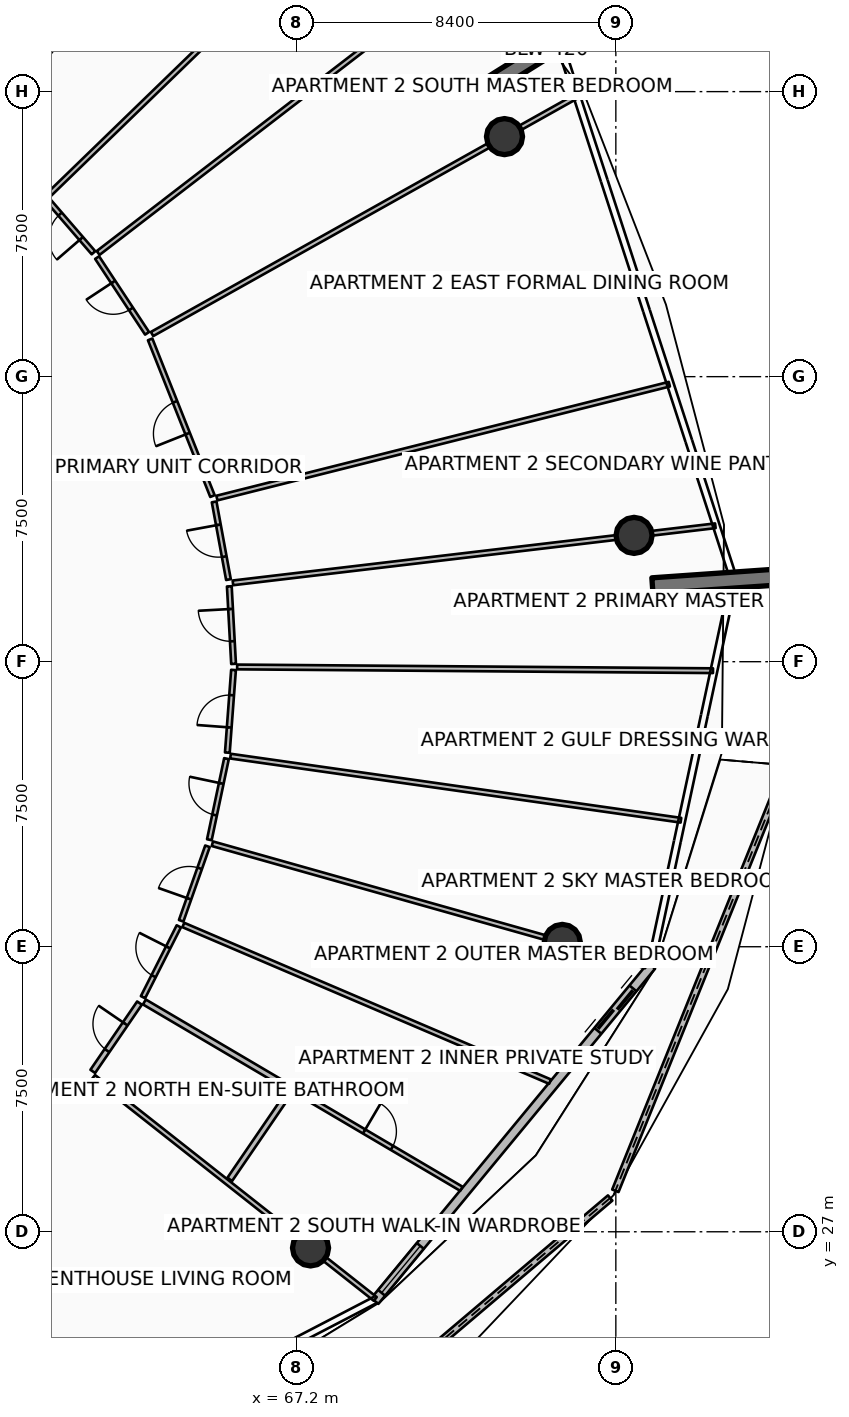
"""IFC4 building model, lengths in metres.
Left out: names, types, materials, properties, quantities, classifications, styles, units other than length and angle.
Written with IfcOpenShell. Run it as: python <this file> out.ifc"""

import sys

from ifc_helpers import new_model, si_unit, direction, frame, frame_2d, origin, origin_2d, place, context, subcontext, project, spatial, polyline, rectangle, circle, outline, extrude, element, fill, save


model = new_model("IFC4")
c1 = context("Model", 3, precision=1e-05, world=origin(), true_north=direction((0.0, 1.0)))
c2 = subcontext(c1, "Body", "Model", "MODEL_VIEW")
j1 = project(units=[si_unit("LENGTHUNIT", "METRE"), si_unit("PLANEANGLEUNIT", "RADIAN")], contexts=[c1])
p1 = place(None, origin())
s1 = spatial("IfcSite", under=j1, at=p1, CompositionType="ELEMENT")
p2 = place(p1, origin())
s2 = spatial("IfcBuilding", under=s1, at=p2, CompositionType="ELEMENT")
p3 = place(p2, frame((0.0, 0.0, 286.75)))
s3 = spatial("IfcBuildingStorey", under=s2, at=p3, CompositionType="ELEMENT", Elevation=286.75)
p4 = place(p3, frame((72.281, 57.173, 0.0), z_axis=(0.0, 0.0, 1.0), x_axis=(0.848033572426, 0.529942506352, 0.0)))
e1 = element("IfcWall", 1, at=p4, inside=s3, PredefinedType="SOLIDWALL", context=c2, shape_type="SweptSolid", body=[
    extrude(rectangle(XDim=3.5, YDim=0.42, at=frame_2d((1.75, 0.0))), origin(), (0.0, 0.0, 1.0), 3.85),
])
p5 = place(p3, frame((76.562, 43.997, 0.0), z_axis=(0.0, 0.0, 1.0), x_axis=(0.997563824095, 0.069759707979, 0.0)))
e2 = element("IfcWall", 2, at=p5, inside=s3, PredefinedType="SOLIDWALL", context=c2, shape_type="SweptSolid", body=[
    extrude(rectangle(XDim=3.5, YDim=0.42, at=frame_2d((1.75, 0.0))), origin(), (0.0, 0.0, 1.0), 3.85),
])
for number, where, z_axis, x_axis in (
    (3, (72.67, 55.816, 0.0), (0.0, 0.0, 1.0), (1.0, 0.0, 0.0)),
    (4, (67.566, 26.575, 0.0), (0.0, 0.0, 1.0), (1.0, 0.0, 0.0)),
    (5, (74.191, 34.613, 0.0), (0.0, 0.0, 1.0), (1.0, 0.0, 0.0)),
    (6, (76.08, 45.323, 0.0), (0.0, 0.0, 1.0), (1.0, 0.0, 0.0)),
):
    element("IfcColumn", number, at=place(p3, frame(where, z_axis=z_axis, x_axis=x_axis)), inside=s3, PredefinedType="COLUMN", context=c2, shape_type="SweptSolid", body=[
        extrude(circle(Radius=0.475, at=origin_2d()), origin(), (0.0, 0.0, 1.0), 3.59),
    ])
p6 = place(p3, frame((66.652, 20.429, 0.0), z_axis=(0.0, 0.0, 1.0), x_axis=(0.762735629532, 0.646710413896, 0.0)))
e7 = element("IfcWall", 7, at=p6, inside=s3, PredefinedType="PARAPET", context=c2, shape_type="SweptSolid", body=[
    extrude(outline(polyline([(0.0, 0.0), (11.535, 0.0), (11.535, 1.632), (5.768, 1.798), (0.0, 1.86), (0.0, 0.0)])), frame((0.0, 0.09, 0.0), z_axis=(0.0, -1.0, 0.0), x_axis=(1.0, 0.0, 0.0)), (0.0, 0.0, 1.0), 0.18),
])
p7 = place(p3, frame((75.587, 28.078, 0.0), z_axis=(0.0, 0.0, 1.0), x_axis=(0.374094279698, 0.927390678138, 0.0)))
e8 = element("IfcWall", 8, at=p7, inside=s3, PredefinedType="PARAPET", context=c2, shape_type="SweptSolid", body=[
    extrude(outline(polyline([(0.0, 0.0), (12.075, 0.0), (12.075, 1.233), (6.037, 1.418), (0.0, 1.632), (0.0, 0.0)])), frame((0.0, 0.09, 0.0), z_axis=(0.0, -1.0, 0.0), x_axis=(1.0, 0.0, 0.0)), (0.0, 0.0, 1.0), 0.18),
])
p8 = place(p3, frame((69.258, 25.178, 0.0), z_axis=(0.0, 0.0, 1.0), x_axis=(0.636680093065, 0.771128043255, 0.0)))
e9 = element("IfcWall", 9, at=p8, inside=s3, PredefinedType="SOLIDWALL", context=c2, shape_type="SweptSolid", body=[
    extrude(rectangle(XDim=11.438, YDim=0.24, at=frame_2d((5.719, 0.0))), origin(), (0.0, 0.0, 1.0), 2.54),
])
p9 = place(p8, frame((9.218, 0.0, 0.0)))
e10 = element("IfcOpeningElement", 10, at=p9, cuts=e9, PredefinedType="OPENING", context=c2, shape_type="SweptSolid", body=[
    extrude(rectangle(XDim=1.45, YDim=2.15, at=frame_2d((0.725, 1.075))), frame((0.0, 0.13, 0.0), z_axis=(0.0, -1.0, 0.0), x_axis=(1.0, 0.0, 0.0)), (0.0, 0.0, 1.0), 0.26),
])
p10 = place(p8, frame((0.28, 0.0, 0.65)))
e11 = element("IfcOpeningElement", 11, at=p10, cuts=e9, PredefinedType="OPENING", context=c2, shape_type="SweptSolid", body=[
    extrude(rectangle(XDim=1.6, YDim=1.5, at=frame_2d((0.8, 0.75))), frame((0.0, 0.13, 0.0), z_axis=(0.0, -1.0, 0.0), x_axis=(1.0, 0.0, 0.0)), (0.0, 0.0, 1.0), 0.26),
])
p11 = place(p3, frame((56.188, 52.386, 0.0), z_axis=(0.0, 0.0, 1.0), x_axis=(0.619097230176, 0.785314344443, 0.0)))
e12 = element("IfcWall", 12, at=p11, inside=s3, PredefinedType="PARTITIONING", context=c2, shape_type="SweptSolid", body=[
    extrude(rectangle(XDim=16.37, YDim=0.18, at=frame_2d((8.185, 0.0))), origin(), (0.0, 0.0, 1.0), 2.957),
])
p12 = place(p3, frame((61.858, 31.075, 0.0), z_axis=(0.0, 0.0, 1.0), x_axis=(0.785325513659, -0.619083061952, 0.0)))
e13 = element("IfcWall", 13, at=p12, inside=s3, PredefinedType="PARTITIONING", context=c2, shape_type="SweptSolid", body=[
    extrude(rectangle(XDim=9.438, YDim=0.125, at=frame_2d((4.719, 0.0))), origin(), (0.0, 0.0, 1.0), 2.957),
])
p13 = place(p3, frame((61.836, 31.22, 0.0), z_axis=(0.0, 0.0, 1.0), x_axis=(0.564720073442, 0.825282520505, 0.0)))
e14 = element("IfcWall", 14, at=p13, inside=s3, PredefinedType="PARTITIONING", context=c2, shape_type="SweptSolid", body=[
    extrude(rectangle(XDim=2.178, YDim=0.15, at=frame_2d((1.089, 0.0))), origin(), (0.0, 0.0, 1.0), 2.957),
])
p14 = place(p13, frame((0.664, 0.0, 0.0)))
e15 = element("IfcOpeningElement", 15, at=p14, cuts=e14, PredefinedType="OPENING", context=c2, shape_type="SweptSolid", body=[
    extrude(rectangle(XDim=0.85, YDim=2.06, at=frame_2d((0.425, 1.03))), frame((0.0, 0.085, 0.0), z_axis=(0.0, -1.0, 0.0), x_axis=(1.0, 0.0, 0.0)), (0.0, 0.0, 1.0), 0.17),
])
p15 = place(p3, frame((65.44, 28.378, 0.0), z_axis=(0.0, 0.0, 1.0), x_axis=(0.564687043446, 0.82530512113, 0.0)))
e16 = element("IfcWall", 16, at=p15, inside=s3, PredefinedType="PARTITIONING", context=c2, shape_type="SweptSolid", body=[
    extrude(rectangle(XDim=2.798, YDim=0.15, at=frame_2d((1.399, 0.0))), origin(), (0.0, 0.0, 1.0), 2.957),
])
p16 = place(p3, frame((63.194, 33.046, 0.0), z_axis=(0.0, 0.0, 1.0), x_axis=(0.8615329034, -0.507701739566, 0.0)))
e17 = element("IfcWall", 17, at=p16, inside=s3, PredefinedType="PARTITIONING", context=c2, shape_type="SweptSolid", body=[
    extrude(rectangle(XDim=4.46, YDim=0.15, at=frame_2d((2.23, 0.0))), origin(), (0.0, 0.0, 1.0), 3.03),
])
p17 = place(p3, frame((67.149, 30.716, 0.0), z_axis=(0.0, 0.0, 1.0), x_axis=(0.861535840118, -0.507696756136, 0.0)))
e18 = element("IfcWall", 18, at=p17, inside=s3, PredefinedType="PARTITIONING", context=c2, shape_type="SweptSolid", body=[
    extrude(rectangle(XDim=5.092, YDim=0.125, at=frame_2d((2.546, 0.0))), origin(), (0.0, 0.0, 1.0), 3.03),
])
p18 = place(p17, frame((2.121, 0.0, 0.0)))
e19 = element("IfcOpeningElement", 19, at=p18, cuts=e18, PredefinedType="OPENING", context=c2, shape_type="SweptSolid", body=[
    extrude(rectangle(XDim=0.85, YDim=2.06, at=frame_2d((0.425, 1.03))), frame((0.0, 0.073, 0.0), z_axis=(0.0, -1.0, 0.0), x_axis=(1.0, 0.0, 0.0)), (0.0, 0.0, 1.0), 0.145),
])
p19 = place(p3, frame((64.219, 35.072, 0.0), z_axis=(0.0, 0.0, 1.0), x_axis=(0.91961011962, -0.392832315235, 0.0)))
e20 = element("IfcWall", 20, at=p19, inside=s3, PredefinedType="PARTITIONING", context=c2, shape_type="SweptSolid", body=[
    extrude(rectangle(XDim=10.493, YDim=0.125, at=frame_2d((5.247, 0.0))), origin(), (0.0, 0.0, 1.0), 3.03),
])
p20 = place(p3, frame((63.157, 33.172, 0.0), z_axis=(0.0, 0.0, 1.0), x_axis=(0.451230403471, 0.892407487073, 0.0)))
e21 = element("IfcWall", 21, at=p20, inside=s3, PredefinedType="PARTITIONING", context=c2, shape_type="SweptSolid", body=[
    extrude(rectangle(XDim=2.088, YDim=0.125, at=frame_2d((1.044, 0.0))), origin(), (0.0, 0.0, 1.0), 3.03),
])
p21 = place(p20, frame((0.619, 0.0, 0.0)))
e22 = element("IfcOpeningElement", 22, at=p21, cuts=e21, PredefinedType="OPENING", context=c2, shape_type="SweptSolid", body=[
    extrude(rectangle(XDim=0.85, YDim=2.06, at=frame_2d((0.425, 1.03))), frame((0.0, 0.073, 0.0), z_axis=(0.0, -1.0, 0.0), x_axis=(1.0, 0.0, 0.0)), (0.0, 0.0, 1.0), 0.145),
])
p22 = place(p3, frame((64.162, 35.183, 0.0), z_axis=(0.0, 0.0, 1.0), x_axis=(0.332881557629, 0.942968646664, 0.0)))
e23 = element("IfcWall", 23, at=p22, inside=s3, PredefinedType="PARTITIONING", context=c2, shape_type="SweptSolid", body=[
    extrude(rectangle(XDim=2.079, YDim=0.125, at=frame_2d((1.039, 0.0))), origin(), (0.0, 0.0, 1.0), 2.957),
])
p23 = place(p22, frame((0.614, 0.0, 0.0)))
e24 = element("IfcOpeningElement", 24, at=p23, cuts=e23, PredefinedType="OPENING", context=c2, shape_type="SweptSolid", body=[
    extrude(rectangle(XDim=0.85, YDim=2.06, at=frame_2d((0.425, 1.03))), frame((0.0, 0.073, 0.0), z_axis=(0.0, -1.0, 0.0), x_axis=(1.0, 0.0, 0.0)), (0.0, 0.0, 1.0), 0.145),
])
p24 = place(p3, frame((64.983, 37.21, 0.0), z_axis=(0.0, 0.0, 1.0), x_axis=(0.962453678557, -0.271445973691, 0.0)))
e25 = element("IfcWall", 25, at=p24, inside=s3, PredefinedType="PARTITIONING", context=c2, shape_type="SweptSolid", body=[
    extrude(rectangle(XDim=11.85, YDim=0.125, at=frame_2d((5.925, 0.0))), origin(), (0.0, 0.0, 1.0), 2.957),
])
p25 = place(p3, frame((65.46, 39.515, 0.0), z_axis=(0.0, 0.0, 1.0), x_axis=(0.990024400928, -0.140896009764, 0.0)))
e26 = element("IfcWall", 26, at=p25, inside=s3, PredefinedType="PARTITIONING", context=c2, shape_type="SweptSolid", body=[
    extrude(rectangle(XDim=11.972, YDim=0.125, at=frame_2d((5.986, 0.0))), origin(), (0.0, 0.0, 1.0), 3.03),
])
p26 = place(p3, frame((65.635, 41.862, 0.0), z_axis=(0.0, 0.0, 1.0), x_axis=(0.999969129377, -0.007857499155, 0.0)))
e27 = element("IfcWall", 27, at=p26, inside=s3, PredefinedType="PARTITIONING", context=c2, shape_type="SweptSolid", body=[
    extrude(rectangle(XDim=12.522, YDim=0.125, at=frame_2d((6.261, 0.0))), origin(), (0.0, 0.0, 1.0), 3.03),
])
p27 = place(p3, frame((64.904, 37.316, 0.0), z_axis=(0.0, 0.0, 1.0), x_axis=(0.206653610436, 0.978414168588, 0.0)))
e28 = element("IfcWall", 28, at=p27, inside=s3, PredefinedType="PARTITIONING", context=c2, shape_type="SweptSolid", body=[
    extrude(rectangle(XDim=2.181, YDim=0.125, at=frame_2d((1.09, 0.0))), origin(), (0.0, 0.0, 1.0), 2.957),
])
p28 = place(p27, frame((0.665, 0.0, 0.0)))
e29 = element("IfcOpeningElement", 29, at=p28, cuts=e28, PredefinedType="OPENING", context=c2, shape_type="SweptSolid", body=[
    extrude(rectangle(XDim=0.85, YDim=2.06, at=frame_2d((0.425, 1.03))), frame((0.0, 0.073, 0.0), z_axis=(0.0, -1.0, 0.0), x_axis=(1.0, 0.0, 0.0)), (0.0, 0.0, 1.0), 0.145),
])
p29 = place(p3, frame((65.377, 39.607, 0.0), z_axis=(0.0, 0.0, 1.0), x_axis=(0.074547851994, 0.997217437555, 0.0)))
e30 = element("IfcWall", 30, at=p29, inside=s3, PredefinedType="PARTITIONING", context=c2, shape_type="SweptSolid", body=[
    extrude(rectangle(XDim=2.181, YDim=0.125, at=frame_2d((1.091, 0.0))), origin(), (0.0, 0.0, 1.0), 3.03),
])
p30 = place(p29, frame((0.666, 0.0, 0.0)))
e31 = element("IfcOpeningElement", 31, at=p30, cuts=e30, PredefinedType="OPENING", context=c2, shape_type="SweptSolid", body=[
    extrude(rectangle(XDim=0.85, YDim=2.06, at=frame_2d((0.425, 1.03))), frame((0.0, 0.073, 0.0), z_axis=(0.0, -1.0, 0.0), x_axis=(1.0, 0.0, 0.0)), (0.0, 0.0, 1.0), 0.145),
])
p31 = place(p3, frame((65.541, 41.942, 0.0), z_axis=(0.0, 0.0, 1.0), x_axis=(-0.054960479128, 0.998488530597, 0.0)))
e32 = element("IfcWall", 32, at=p31, inside=s3, PredefinedType="PARTITIONING", context=c2, shape_type="SweptSolid", body=[
    extrude(rectangle(XDim=2.043, YDim=0.125, at=frame_2d((1.022, 0.0))), origin(), (0.0, 0.0, 1.0), 2.957),
])
p32 = place(p31, frame((0.597, 0.0, 0.0)))
e33 = element("IfcOpeningElement", 33, at=p32, cuts=e32, PredefinedType="OPENING", context=c2, shape_type="SweptSolid", body=[
    extrude(rectangle(XDim=0.85, YDim=2.06, at=frame_2d((0.425, 1.03))), frame((0.0, 0.073, 0.0), z_axis=(0.0, -1.0, 0.0), x_axis=(1.0, 0.0, 0.0)), (0.0, 0.0, 1.0), 0.145),
])
p33 = place(p3, frame((65.524, 44.074, 0.0), z_axis=(0.0, 0.0, 1.0), x_axis=(0.993069543008, 0.117528221075, 0.0)))
e34 = element("IfcWall", 34, at=p33, inside=s3, PredefinedType="PARTITIONING", context=c2, shape_type="SweptSolid", body=[
    extrude(rectangle(XDim=12.784, YDim=0.125, at=frame_2d((6.392, 0.0))), origin(), (0.0, 0.0, 1.0), 2.957),
])
p34 = place(p3, frame((65.102, 46.305, 0.0), z_axis=(0.0, 0.0, 1.0), x_axis=(0.969744651586, 0.244121508108, 0.0)))
e35 = element("IfcWall", 35, at=p34, inside=s3, PredefinedType="PARTITIONING", context=c2, shape_type="SweptSolid", body=[
    extrude(rectangle(XDim=12.277, YDim=0.125, at=frame_2d((6.138, 0.0))), origin(), (0.0, 0.0, 1.0), 3.03),
])
p35 = place(p3, frame((65.406, 44.161, 0.0), z_axis=(0.0, 0.0, 1.0), x_axis=(-0.181252122481, 0.983436661965, 0.0)))
e36 = element("IfcWall", 36, at=p35, inside=s3, PredefinedType="PARTITIONING", context=c2, shape_type="SweptSolid", body=[
    extrude(rectangle(XDim=2.078, YDim=0.125, at=frame_2d((1.039, 0.0))), origin(), (0.0, 0.0, 1.0), 2.957),
])
p36 = place(p35, frame((0.614, 0.0, 0.0)))
e37 = element("IfcOpeningElement", 37, at=p36, cuts=e36, PredefinedType="OPENING", context=c2, shape_type="SweptSolid", body=[
    extrude(rectangle(XDim=0.85, YDim=2.06, at=frame_2d((0.425, 1.03))), frame((0.0, 0.073, 0.0), z_axis=(0.0, -1.0, 0.0), x_axis=(1.0, 0.0, 0.0)), (0.0, 0.0, 1.0), 0.145),
])
p37 = place(p3, frame((64.986, 46.358, 0.0), z_axis=(0.0, 0.0, 1.0), x_axis=(-0.369596956752, 0.929192170414, 0.0)))
e38 = element("IfcWall", 38, at=p37, inside=s3, PredefinedType="PARTITIONING", context=c2, shape_type="SweptSolid", body=[
    extrude(rectangle(XDim=4.437, YDim=0.125, at=frame_2d((2.219, 0.0))), origin(), (0.0, 0.0, 1.0), 2.957),
])
p38 = place(p37, frame((1.768, 0.0, 0.0)))
e39 = element("IfcOpeningElement", 39, at=p38, cuts=e38, PredefinedType="OPENING", context=c2, shape_type="SweptSolid", body=[
    extrude(rectangle(XDim=0.9, YDim=2.08, at=frame_2d((0.45, 1.04))), frame((0.0, 0.073, 0.0), z_axis=(0.0, -1.0, 0.0), x_axis=(1.0, 0.0, 0.0)), (0.0, 0.0, 1.0), 0.145),
])
p39 = place(p3, frame((63.396, 50.622, 0.0), z_axis=(0.0, 0.0, 1.0), x_axis=(0.872499176967, 0.4886155812, 0.0)))
e40 = element("IfcWall", 40, at=p39, inside=s3, PredefinedType="PARTITIONING", context=c2, shape_type="SweptSolid", body=[
    extrude(rectangle(XDim=12.784, YDim=0.125, at=frame_2d((6.392, 0.0))), origin(), (0.0, 0.0, 1.0), 2.957),
])
p40 = place(p3, frame((61.978, 52.754, 0.0), z_axis=(0.0, 0.0, 1.0), x_axis=(0.792559605076, 0.609794450944, 0.0)))
e41 = element("IfcWall", 41, at=p40, inside=s3, PredefinedType="PARTITIONING", context=c2, shape_type="SweptSolid", body=[
    extrude(rectangle(XDim=12.406, YDim=0.125, at=frame_2d((6.203, 0.0))), origin(), (0.0, 0.0, 1.0), 3.03),
])
p41 = place(p3, frame((60.665, 54.273, 0.0), z_axis=(0.0, 0.0, 1.0), x_axis=(0.718133524399, 0.695905339205, 0.0)))
e42 = element("IfcWall", 42, at=p41, inside=s3, PredefinedType="PARTITIONING", context=c2, shape_type="SweptSolid", body=[
    extrude(rectangle(XDim=11.972, YDim=0.125, at=frame_2d((5.986, 0.0))), origin(), (0.0, 0.0, 1.0), 3.03),
])
p42 = place(p3, frame((63.265, 50.64, 0.0), z_axis=(0.0, 0.0, 1.0), x_axis=(-0.550634170063, 0.834746674602, 0.0)))
e43 = element("IfcWall", 43, at=p42, inside=s3, PredefinedType="PARTITIONING", context=c2, shape_type="SweptSolid", body=[
    extrude(rectangle(XDim=2.387, YDim=0.125, at=frame_2d((1.194, 0.0))), origin(), (0.0, 0.0, 1.0), 2.957),
])
p43 = place(p42, frame((0.769, 0.0, 0.0)))
e44 = element("IfcOpeningElement", 44, at=p43, cuts=e43, PredefinedType="OPENING", context=c2, shape_type="SweptSolid", body=[
    extrude(rectangle(XDim=0.85, YDim=2.06, at=frame_2d((0.425, 1.03))), frame((0.0, 0.073, 0.0), z_axis=(0.0, -1.0, 0.0), x_axis=(1.0, 0.0, 0.0)), (0.0, 0.0, 1.0), 0.145),
])
p44 = place(p3, frame((61.854, 52.76, 0.0), z_axis=(0.0, 0.0, 1.0), x_axis=(-0.653948493608, 0.756539072162, 0.0)))
e45 = element("IfcWall", 45, at=p44, inside=s3, PredefinedType="PARTITIONING", context=c2, shape_type="SweptSolid", body=[
    extrude(rectangle(XDim=1.837, YDim=0.125, at=frame_2d((0.918, 0.0))), origin(), (0.0, 0.0, 1.0), 3.03),
])
p45 = place(p44, frame((0.494, 0.0, 0.0)))
e46 = element("IfcOpeningElement", 46, at=p45, cuts=e45, PredefinedType="OPENING", context=c2, shape_type="SweptSolid", body=[
    extrude(rectangle(XDim=0.85, YDim=2.06, at=frame_2d((0.425, 1.03))), frame((0.0, 0.073, 0.0), z_axis=(0.0, -1.0, 0.0), x_axis=(1.0, 0.0, 0.0)), (0.0, 0.0, 1.0), 0.145),
])
p46 = place(p9, origin())
e47 = element("IfcDoor", 47, at=p46, inside=s3, OperationType="DOUBLE_DOOR_SLIDING", PredefinedType="DOOR", context=c2, shape_type="SweptSolid", body=[
    extrude(rectangle(XDim=1.45, YDim=2.15, at=frame_2d((0.725, 1.075))), frame((0.0, 0.025, 0.0), z_axis=(0.0, -1.0, 0.0), x_axis=(1.0, 0.0, 0.0)), (0.0, 0.0, 1.0), 0.05),
])
fill(e10, e47)
p47 = place(p10, origin())
e48 = element("IfcWindow", 48, at=p47, inside=s3, PartitioningType="SINGLE_PANEL", PredefinedType="WINDOW", context=c2, shape_type="SweptSolid", body=[
    extrude(rectangle(XDim=1.6, YDim=1.5, at=frame_2d((0.8, 0.75))), frame((0.0, 0.03, 0.0), z_axis=(0.0, -1.0, 0.0), x_axis=(1.0, 0.0, 0.0)), (0.0, 0.0, 1.0), 0.06),
])
fill(e11, e48)
p48 = place(p14, origin())
e49 = element("IfcDoor", 49, at=p48, inside=s3, OperationType="SINGLE_SWING_RIGHT", PredefinedType="DOOR", context=c2, shape_type="SweptSolid", body=[
    extrude(rectangle(XDim=0.85, YDim=2.06, at=frame_2d((0.425, 1.03))), frame((0.0, 0.025, 0.0), z_axis=(0.0, -1.0, 0.0), x_axis=(1.0, 0.0, 0.0)), (0.0, 0.0, 1.0), 0.05),
])
fill(e15, e49)
p49 = place(p18, origin())
e50 = element("IfcDoor", 50, at=p49, inside=s3, OperationType="SINGLE_SWING_LEFT", PredefinedType="DOOR", context=c2, shape_type="SweptSolid", body=[
    extrude(rectangle(XDim=0.85, YDim=2.06, at=frame_2d((0.425, 1.03))), frame((0.0, 0.025, 0.0), z_axis=(0.0, -1.0, 0.0), x_axis=(1.0, 0.0, 0.0)), (0.0, 0.0, 1.0), 0.05),
])
fill(e19, e50)
p50 = place(p21, origin())
e51 = element("IfcDoor", 51, at=p50, inside=s3, OperationType="SINGLE_SWING_RIGHT", PredefinedType="DOOR", context=c2, shape_type="SweptSolid", body=[
    extrude(rectangle(XDim=0.85, YDim=2.06, at=frame_2d((0.425, 1.03))), frame((0.0, 0.025, 0.0), z_axis=(0.0, -1.0, 0.0), x_axis=(1.0, 0.0, 0.0)), (0.0, 0.0, 1.0), 0.05),
])
fill(e22, e51)
p51 = place(p23, origin())
e52 = element("IfcDoor", 52, at=p51, inside=s3, OperationType="SINGLE_SWING_LEFT", PredefinedType="DOOR", context=c2, shape_type="SweptSolid", body=[
    extrude(rectangle(XDim=0.85, YDim=2.06, at=frame_2d((0.425, 1.03))), frame((0.0, 0.025, 0.0), z_axis=(0.0, -1.0, 0.0), x_axis=(1.0, 0.0, 0.0)), (0.0, 0.0, 1.0), 0.05),
])
fill(e24, e52)
p52 = place(p28, origin())
e53 = element("IfcDoor", 53, at=p52, inside=s3, OperationType="SINGLE_SWING_RIGHT", PredefinedType="DOOR", context=c2, shape_type="SweptSolid", body=[
    extrude(rectangle(XDim=0.85, YDim=2.06, at=frame_2d((0.425, 1.03))), frame((0.0, 0.025, 0.0), z_axis=(0.0, -1.0, 0.0), x_axis=(1.0, 0.0, 0.0)), (0.0, 0.0, 1.0), 0.05),
])
fill(e29, e53)
p53 = place(p30, origin())
e54 = element("IfcDoor", 54, at=p53, inside=s3, OperationType="SINGLE_SWING_LEFT", PredefinedType="DOOR", context=c2, shape_type="SweptSolid", body=[
    extrude(rectangle(XDim=0.85, YDim=2.06, at=frame_2d((0.425, 1.03))), frame((0.0, 0.025, 0.0), z_axis=(0.0, -1.0, 0.0), x_axis=(1.0, 0.0, 0.0)), (0.0, 0.0, 1.0), 0.05),
])
fill(e31, e54)
p54 = place(p32, origin())
e55 = element("IfcDoor", 55, at=p54, inside=s3, OperationType="SINGLE_SWING_RIGHT", PredefinedType="DOOR", context=c2, shape_type="SweptSolid", body=[
    extrude(rectangle(XDim=0.85, YDim=2.06, at=frame_2d((0.425, 1.03))), frame((0.0, 0.025, 0.0), z_axis=(0.0, -1.0, 0.0), x_axis=(1.0, 0.0, 0.0)), (0.0, 0.0, 1.0), 0.05),
])
fill(e33, e55)
p55 = place(p36, origin())
e56 = element("IfcDoor", 56, at=p55, inside=s3, OperationType="SINGLE_SWING_RIGHT", PredefinedType="DOOR", context=c2, shape_type="SweptSolid", body=[
    extrude(rectangle(XDim=0.85, YDim=2.06, at=frame_2d((0.425, 1.03))), frame((0.0, 0.025, 0.0), z_axis=(0.0, -1.0, 0.0), x_axis=(1.0, 0.0, 0.0)), (0.0, 0.0, 1.0), 0.05),
])
fill(e37, e56)
p56 = place(p38, origin())
e57 = element("IfcDoor", 57, at=p56, inside=s3, OperationType="SINGLE_SWING_LEFT", PredefinedType="DOOR", context=c2, shape_type="SweptSolid", body=[
    extrude(rectangle(XDim=0.9, YDim=2.08, at=frame_2d((0.45, 1.04))), frame((0.0, 0.025, 0.0), z_axis=(0.0, -1.0, 0.0), x_axis=(1.0, 0.0, 0.0)), (0.0, 0.0, 1.0), 0.05),
])
fill(e39, e57)
p57 = place(p43, origin())
e58 = element("IfcDoor", 58, at=p57, inside=s3, OperationType="SINGLE_SWING_RIGHT", PredefinedType="DOOR", context=c2, shape_type="SweptSolid", body=[
    extrude(rectangle(XDim=0.85, YDim=2.06, at=frame_2d((0.425, 1.03))), frame((0.0, 0.025, 0.0), z_axis=(0.0, -1.0, 0.0), x_axis=(1.0, 0.0, 0.0)), (0.0, 0.0, 1.0), 0.05),
])
fill(e44, e58)
p58 = place(p45, origin())
e59 = element("IfcDoor", 59, at=p58, inside=s3, OperationType="SINGLE_SWING_LEFT", PredefinedType="DOOR", context=c2, shape_type="SweptSolid", body=[
    extrude(rectangle(XDim=0.85, YDim=2.06, at=frame_2d((0.425, 1.03))), frame((0.0, 0.025, 0.0), z_axis=(0.0, -1.0, 0.0), x_axis=(1.0, 0.0, 0.0)), (0.0, 0.0, 1.0), 0.05),
])
fill(e46, e59)
save(model, sys.argv[1])
